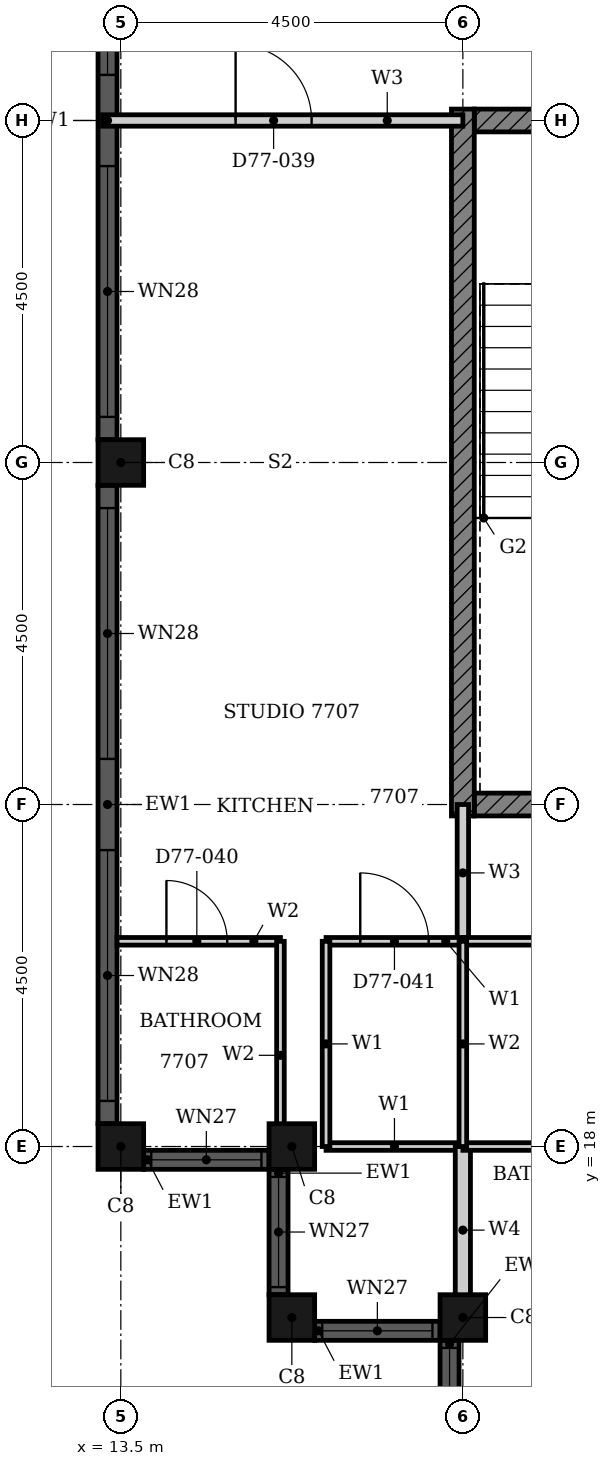
"""IFC4 building model, lengths in metres.
Left out: names, types, materials, properties, quantities, classifications, styles, units other than length and angle.
Written with IfcOpenShell. Run it as: python <this file> out.ifc"""

import sys

from ifc_helpers import new_model, si_unit, direction, frame, frame_2d, origin, origin_2d, place, context, subcontext, project, spatial, rectangle, hollow_rectangle, extrude, element, fill, save


model = new_model("IFC4")
c1 = context("Model", 3, precision=1e-05, world=origin(), true_north=direction((0.0, 1.0)))
c2 = subcontext(c1, "Body", "Model", "MODEL_VIEW")
j1 = project(units=[si_unit("LENGTHUNIT", "METRE"), si_unit("PLANEANGLEUNIT", "RADIAN")], contexts=[c1])
p1 = place(None, origin())
s1 = spatial("IfcSite", under=j1, at=p1, CompositionType="ELEMENT")
p2 = place(p1, origin())
s2 = spatial("IfcBuilding", under=s1, at=p2, CompositionType="ELEMENT")
p3 = place(p2, frame((0.0, 0.0, 301.9)))
s3 = spatial("IfcBuildingStorey", under=s2, at=p3, CompositionType="ELEMENT", Elevation=301.9)
for number, where, z_axis, x_axis in (
    (1, (13.5, 27.0, 0.0), (0.0, 0.0, 1.0), (1.0, 0.0, 0.0)),
    (2, (13.5, 18.0, 0.0), (0.0, 0.0, 1.0), (1.0, 0.0, 0.0)),
    (3, (15.75, 18.0, 0.0), (0.0, 0.0, 1.0), (1.0, 0.0, 0.0)),
    (4, (15.75, 15.75, 0.0), (0.0, 0.0, 1.0), (1.0, 0.0, 0.0)),
    (5, (18.0, 15.75, 0.0), (0.0, 0.0, 1.0), (1.0, 0.0, 0.0)),
):
    element("IfcColumn", number, at=place(p3, frame(where, z_axis=z_axis, x_axis=x_axis)), inside=s3, PredefinedType="COLUMN", context=c2, shape_type="SweptSolid", body=[
        extrude(hollow_rectangle(XDim=0.6, YDim=0.6, WallThickness=0.02, at=origin_2d()), origin(), (0.0, 0.0, 1.0), 3.7),
    ])
p4 = place(p3, frame((13.325, 35.7, 0.0), z_axis=(0.0, 0.0, 1.0), x_axis=(0.0, -1.0, 0.0)))
e6 = element("IfcWall", 6, at=p4, inside=s3, PredefinedType="SOLIDWALL", context=c2, shape_type="SweptSolid", body=[
    extrude(rectangle(XDim=8.4, YDim=0.25, at=frame_2d((4.2, 0.0))), origin(), (0.0, 0.0, 1.0), 3.7),
])
p5 = place(p4, frame((0.3, 0.0, 0.45)))
e7 = element("IfcOpeningElement", 7, at=p5, cuts=e6, PredefinedType="OPENING", context=c2, shape_type="SweptSolid", body=[
    extrude(rectangle(XDim=3.3, YDim=1.8, at=frame_2d((1.65, 0.9))), frame((0.0, 0.135, 0.0), z_axis=(0.0, -1.0, 0.0), x_axis=(1.0, 0.0, 0.0)), (0.0, 0.0, 1.0), 0.27),
])
p6 = place(p4, frame((4.8, 0.0, 0.45)))
e8 = element("IfcOpeningElement", 8, at=p6, cuts=e6, PredefinedType="OPENING", context=c2, shape_type="SweptSolid", body=[
    extrude(rectangle(XDim=3.3, YDim=1.8, at=frame_2d((1.65, 0.9))), frame((0.0, 0.135, 0.0), z_axis=(0.0, -1.0, 0.0), x_axis=(1.0, 0.0, 0.0)), (0.0, 0.0, 1.0), 0.27),
])
p7 = place(p3, frame((13.325, 26.7, 0.0), z_axis=(0.0, 0.0, 1.0), x_axis=(0.0, -1.0, 0.0)))
e9 = element("IfcWall", 9, at=p7, inside=s3, PredefinedType="SOLIDWALL", context=c2, shape_type="SweptSolid", body=[
    extrude(rectangle(XDim=8.4, YDim=0.25, at=frame_2d((4.2, 0.0))), origin(), (0.0, 0.0, 1.0), 3.7),
])
p8 = place(p7, frame((0.3, 0.0, 0.45)))
e10 = element("IfcOpeningElement", 10, at=p8, cuts=e9, PredefinedType="OPENING", context=c2, shape_type="SweptSolid", body=[
    extrude(rectangle(XDim=3.3, YDim=1.8, at=frame_2d((1.65, 0.9))), frame((0.0, 0.135, 0.0), z_axis=(0.0, -1.0, 0.0), x_axis=(1.0, 0.0, 0.0)), (0.0, 0.0, 1.0), 0.27),
])
p9 = place(p7, frame((4.8, 0.0, 0.45)))
e11 = element("IfcOpeningElement", 11, at=p9, cuts=e9, PredefinedType="OPENING", context=c2, shape_type="SweptSolid", body=[
    extrude(rectangle(XDim=3.3, YDim=1.8, at=frame_2d((1.65, 0.9))), frame((0.0, 0.135, 0.0), z_axis=(0.0, -1.0, 0.0), x_axis=(1.0, 0.0, 0.0)), (0.0, 0.0, 1.0), 0.27),
])
p10 = place(p3, frame((13.8, 17.825, 0.0), z_axis=(0.0, 0.0, 1.0), x_axis=(1.0, 0.0, 0.0)))
e12 = element("IfcWall", 12, at=p10, inside=s3, PredefinedType="SOLIDWALL", context=c2, shape_type="SweptSolid", body=[
    extrude(rectangle(XDim=1.65, YDim=0.25, at=frame_2d((0.825, 0.0))), origin(), (0.0, 0.0, 1.0), 3.7),
])
p11 = place(p10, frame((0.1, 0.0, 0.9)))
e13 = element("IfcOpeningElement", 13, at=p11, cuts=e12, PredefinedType="OPENING", context=c2, shape_type="SweptSolid", body=[
    extrude(rectangle(XDim=1.45, YDim=1.35, at=frame_2d((0.725, 0.675))), frame((0.0, 0.135, 0.0), z_axis=(0.0, -1.0, 0.0), x_axis=(1.0, 0.0, 0.0)), (0.0, 0.0, 1.0), 0.27),
])
p12 = place(p3, frame((15.575, 17.7, 0.0), z_axis=(0.0, 0.0, 1.0), x_axis=(0.0, -1.0, 0.0)))
e14 = element("IfcWall", 14, at=p12, inside=s3, PredefinedType="SOLIDWALL", context=c2, shape_type="SweptSolid", body=[
    extrude(rectangle(XDim=1.65, YDim=0.25, at=frame_2d((0.825, 0.0))), origin(), (0.0, 0.0, 1.0), 3.7),
])
p13 = place(p12, frame((0.1, 0.0, 0.9)))
e15 = element("IfcOpeningElement", 15, at=p13, cuts=e14, PredefinedType="OPENING", context=c2, shape_type="SweptSolid", body=[
    extrude(rectangle(XDim=1.45, YDim=1.35, at=frame_2d((0.725, 0.675))), frame((0.0, 0.135, 0.0), z_axis=(0.0, -1.0, 0.0), x_axis=(1.0, 0.0, 0.0)), (0.0, 0.0, 1.0), 0.27),
])
p14 = place(p3, frame((16.05, 15.575, 0.0), z_axis=(0.0, 0.0, 1.0), x_axis=(1.0, 0.0, 0.0)))
e16 = element("IfcWall", 16, at=p14, inside=s3, PredefinedType="SOLIDWALL", context=c2, shape_type="SweptSolid", body=[
    extrude(rectangle(XDim=1.65, YDim=0.25, at=frame_2d((0.825, 0.0))), origin(), (0.0, 0.0, 1.0), 3.7),
])
p15 = place(p14, frame((0.1, 0.0, 0.9)))
e17 = element("IfcOpeningElement", 17, at=p15, cuts=e16, PredefinedType="OPENING", context=c2, shape_type="SweptSolid", body=[
    extrude(rectangle(XDim=1.45, YDim=1.35, at=frame_2d((0.725, 0.675))), frame((0.0, 0.135, 0.0), z_axis=(0.0, -1.0, 0.0), x_axis=(1.0, 0.0, 0.0)), (0.0, 0.0, 1.0), 0.27),
])
p16 = place(p3, frame((17.825, 15.45, 0.0), z_axis=(0.0, 0.0, 1.0), x_axis=(0.0, -1.0, 0.0)))
e18 = element("IfcWall", 18, at=p16, inside=s3, PredefinedType="SOLIDWALL", context=c2, shape_type="SweptSolid", body=[
    extrude(rectangle(XDim=1.65, YDim=0.25, at=frame_2d((0.825, 0.0))), origin(), (0.0, 0.0, 1.0), 3.7),
])
p17 = place(p16, frame((0.1, 0.0, 0.9)))
e19 = element("IfcOpeningElement", 19, at=p17, cuts=e18, PredefinedType="OPENING", context=c2, shape_type="SweptSolid", body=[
    extrude(rectangle(XDim=1.45, YDim=1.35, at=frame_2d((0.725, 0.675))), frame((0.0, 0.135, 0.0), z_axis=(0.0, -1.0, 0.0), x_axis=(1.0, 0.0, 0.0)), (0.0, 0.0, 1.0), 0.27),
])
p18 = place(p3, frame((18.15, 22.5, 0.0), z_axis=(0.0, 0.0, 1.0), x_axis=(1.0, 0.0, 0.0)))
e20 = element("IfcWall", 20, at=p18, inside=s3, PredefinedType="SHEAR", context=c2, shape_type="SweptSolid", body=[
    extrude(rectangle(XDim=4.225, YDim=0.3, at=frame_2d((2.113, 0.0))), origin(), (0.0, 0.0, 1.0), 3.2),
])
p19 = place(p3, frame((18.15, 31.5, 0.0), z_axis=(0.0, 0.0, 1.0), x_axis=(1.0, 0.0, 0.0)))
e21 = element("IfcWall", 21, at=p19, inside=s3, PredefinedType="SHEAR", context=c2, shape_type="SweptSolid", body=[
    extrude(rectangle(XDim=9.368, YDim=0.3, at=frame_2d((4.684, 0.0))), origin(), (0.0, 0.0, 1.0), 3.2),
])
p20 = place(p19, frame((4.736, 0.0, 0.0)))
e22 = element("IfcOpeningElement", 22, at=p20, cuts=e21, PredefinedType="OPENING", context=c2, shape_type="SweptSolid", body=[
    extrude(rectangle(XDim=1.8, YDim=2.1, at=frame_2d((0.9, 1.05))), frame((0.0, 0.16, 0.0), z_axis=(0.0, -1.0, 0.0), x_axis=(1.0, 0.0, 0.0)), (0.0, 0.0, 1.0), 0.32),
])
p21 = place(p3, frame((18.0, 22.35, 0.0), z_axis=(0.0, 0.0, 1.0), x_axis=(0.0, 1.0, 0.0)))
e23 = element("IfcWall", 23, at=p21, inside=s3, PredefinedType="SHEAR", context=c2, shape_type="SweptSolid", body=[
    extrude(rectangle(XDim=9.3, YDim=0.3, at=frame_2d((4.65, 0.0))), origin(), (0.0, 0.0, 1.0), 3.2),
])
p22 = place(p3, frame((13.26, 31.5, 0.0), z_axis=(0.0, 0.0, 1.0), x_axis=(1.0, 0.0, 0.0)))
e24 = element("IfcWall", 24, at=p22, inside=s3, PredefinedType="PARTITIONING", context=c2, shape_type="SweptSolid", body=[
    extrude(rectangle(XDim=4.74, YDim=0.15, at=frame_2d((2.37, 0.0))), origin(), (0.0, 0.0, 1.0), 3.2),
])
p23 = place(p22, frame((1.75, 0.0, 0.0)))
e25 = element("IfcOpeningElement", 25, at=p23, cuts=e24, PredefinedType="OPENING", context=c2, shape_type="SweptSolid", body=[
    extrude(rectangle(XDim=1.0, YDim=2.2, at=frame_2d((0.5, 1.1))), frame((0.0, 0.085, 0.0), z_axis=(0.0, -1.0, 0.0), x_axis=(1.0, 0.0, 0.0)), (0.0, 0.0, 1.0), 0.17),
])
p24 = place(p3, frame((18.0, 20.7, 0.0), z_axis=(0.0, 0.0, 1.0), x_axis=(0.0, 1.0, 0.0)))
e26 = element("IfcWall", 26, at=p24, inside=s3, PredefinedType="PARTITIONING", context=c2, shape_type="SweptSolid", body=[
    extrude(rectangle(XDim=1.8, YDim=0.15, at=frame_2d((0.9, 0.0))), origin(), (0.0, 0.0, 1.0), 3.2),
])
p25 = place(p3, frame((16.2, 18.0, 0.0), z_axis=(0.0, 0.0, 1.0), x_axis=(1.0, 0.0, 0.0)))
e27 = element("IfcWall", 27, at=p25, inside=s3, PredefinedType="PARTITIONING", context=c2, shape_type="SweptSolid", body=[
    extrude(rectangle(XDim=1.8, YDim=0.1, at=frame_2d((0.9, 0.0))), origin(), (0.0, 0.0, 1.0), 3.2),
])
p26 = place(p3, frame((16.2, 20.7, 0.0), z_axis=(0.0, 0.0, 1.0), x_axis=(1.0, 0.0, 0.0)))
e28 = element("IfcWall", 28, at=p26, inside=s3, PredefinedType="PARTITIONING", context=c2, shape_type="SweptSolid", body=[
    extrude(rectangle(XDim=1.8, YDim=0.1, at=frame_2d((0.9, 0.0))), origin(), (0.0, 0.0, 1.0), 3.2),
])
p27 = place(p26, frame((0.45, 0.0, 0.0)))
e29 = element("IfcOpeningElement", 29, at=p27, cuts=e28, PredefinedType="OPENING", context=c2, shape_type="SweptSolid", body=[
    extrude(rectangle(XDim=0.9, YDim=2.1, at=frame_2d((0.45, 1.05))), frame((0.0, 0.06, 0.0), z_axis=(0.0, -1.0, 0.0), x_axis=(1.0, 0.0, 0.0)), (0.0, 0.0, 1.0), 0.12),
])
p28 = place(p3, frame((16.2, 18.0, 0.0), z_axis=(0.0, 0.0, 1.0), x_axis=(0.0, 1.0, 0.0)))
e30 = element("IfcWall", 30, at=p28, inside=s3, PredefinedType="PARTITIONING", context=c2, shape_type="SweptSolid", body=[
    extrude(rectangle(XDim=2.7, YDim=0.1, at=frame_2d((1.35, 0.0))), origin(), (0.0, 0.0, 1.0), 3.2),
])
p29 = place(p3, frame((18.0, 15.8, 0.0), z_axis=(0.0, 0.0, 1.0), x_axis=(0.0, 1.0, 0.0)))
e31 = element("IfcWall", 31, at=p29, inside=s3, PredefinedType="PARTITIONING", context=c2, shape_type="SweptSolid", body=[
    extrude(rectangle(XDim=2.2, YDim=0.2, at=frame_2d((1.1, 0.0))), origin(), (0.0, 0.0, 1.0), 3.2),
])
for number, where, z_axis, x_axis in (
    (32, (18.0, 18.0, 0.0), (0.0, 0.0, 1.0), (1.0, 0.0, 0.0)),
    (33, (18.0, 20.7, 0.0), (0.0, 0.0, 1.0), (1.0, 0.0, 0.0)),
):
    element("IfcWall", number, at=place(p3, frame(where, z_axis=z_axis, x_axis=x_axis)), inside=s3, PredefinedType="PARTITIONING", context=c2, shape_type="SweptSolid", body=[
        extrude(rectangle(XDim=2.4, YDim=0.1, at=frame_2d((1.2, 0.0))), origin(), (0.0, 0.0, 1.0), 3.2),
    ])
p30 = place(p3, frame((13.45, 20.7, 0.0), z_axis=(0.0, 0.0, 1.0), x_axis=(1.0, 0.0, 0.0)))
e34 = element("IfcWall", 34, at=p30, inside=s3, PredefinedType="PARTITIONING", context=c2, shape_type="SweptSolid", body=[
    extrude(rectangle(XDim=2.15, YDim=0.1, at=frame_2d((1.075, 0.0))), origin(), (0.0, 0.0, 1.0), 3.2),
])
p31 = place(p30, frame((0.65, 0.0, 0.0)))
e35 = element("IfcOpeningElement", 35, at=p31, cuts=e34, PredefinedType="OPENING", context=c2, shape_type="SweptSolid", body=[
    extrude(rectangle(XDim=0.8, YDim=2.1, at=frame_2d((0.4, 1.05))), frame((0.0, 0.06, 0.0), z_axis=(0.0, -1.0, 0.0), x_axis=(1.0, 0.0, 0.0)), (0.0, 0.0, 1.0), 0.12),
])
p32 = place(p3, frame((15.6, 17.7, 0.0), z_axis=(0.0, 0.0, 1.0), x_axis=(0.0, 1.0, 0.0)))
e36 = element("IfcWall", 36, at=p32, inside=s3, PredefinedType="PARTITIONING", context=c2, shape_type="SweptSolid", body=[
    extrude(rectangle(XDim=3.0, YDim=0.1, at=frame_2d((1.5, 0.0))), origin(), (0.0, 0.0, 1.0), 3.2),
])
p33 = place(p3, frame((18.0, 18.0, 0.0), z_axis=(0.0, 0.0, 1.0), x_axis=(0.0, 1.0, 0.0)))
e37 = element("IfcWall", 37, at=p33, inside=s3, PredefinedType="PARTITIONING", context=c2, shape_type="SweptSolid", body=[
    extrude(rectangle(XDim=2.7, YDim=0.1, at=frame_2d((1.35, 0.0))), origin(), (0.0, 0.0, 1.0), 3.2),
])
p34 = place(p5, origin())
e38 = element("IfcWindow", 38, at=p34, inside=s3, PartitioningType="SINGLE_PANEL", PredefinedType="WINDOW", context=c2, shape_type="SweptSolid", body=[
    extrude(rectangle(XDim=3.3, YDim=1.8, at=frame_2d((1.65, 0.9))), frame((0.0, 0.03, 0.0), z_axis=(0.0, -1.0, 0.0), x_axis=(1.0, 0.0, 0.0)), (0.0, 0.0, 1.0), 0.06),
])
fill(e7, e38)
p35 = place(p6, origin())
e39 = element("IfcWindow", 39, at=p35, inside=s3, PartitioningType="SINGLE_PANEL", PredefinedType="WINDOW", context=c2, shape_type="SweptSolid", body=[
    extrude(rectangle(XDim=3.3, YDim=1.8, at=frame_2d((1.65, 0.9))), frame((0.0, 0.03, 0.0), z_axis=(0.0, -1.0, 0.0), x_axis=(1.0, 0.0, 0.0)), (0.0, 0.0, 1.0), 0.06),
])
fill(e8, e39)
p36 = place(p8, origin())
e40 = element("IfcWindow", 40, at=p36, inside=s3, PartitioningType="SINGLE_PANEL", PredefinedType="WINDOW", context=c2, shape_type="SweptSolid", body=[
    extrude(rectangle(XDim=3.3, YDim=1.8, at=frame_2d((1.65, 0.9))), frame((0.0, 0.03, 0.0), z_axis=(0.0, -1.0, 0.0), x_axis=(1.0, 0.0, 0.0)), (0.0, 0.0, 1.0), 0.06),
])
fill(e10, e40)
p37 = place(p9, origin())
e41 = element("IfcWindow", 41, at=p37, inside=s3, PartitioningType="SINGLE_PANEL", PredefinedType="WINDOW", context=c2, shape_type="SweptSolid", body=[
    extrude(rectangle(XDim=3.3, YDim=1.8, at=frame_2d((1.65, 0.9))), frame((0.0, 0.03, 0.0), z_axis=(0.0, -1.0, 0.0), x_axis=(1.0, 0.0, 0.0)), (0.0, 0.0, 1.0), 0.06),
])
fill(e11, e41)
p38 = place(p11, origin())
e42 = element("IfcWindow", 42, at=p38, inside=s3, PartitioningType="SINGLE_PANEL", PredefinedType="WINDOW", context=c2, shape_type="SweptSolid", body=[
    extrude(rectangle(XDim=1.45, YDim=1.35, at=frame_2d((0.725, 0.675))), frame((0.0, 0.03, 0.0), z_axis=(0.0, -1.0, 0.0), x_axis=(1.0, 0.0, 0.0)), (0.0, 0.0, 1.0), 0.06),
])
fill(e13, e42)
p39 = place(p13, origin())
e43 = element("IfcWindow", 43, at=p39, inside=s3, PartitioningType="SINGLE_PANEL", PredefinedType="WINDOW", context=c2, shape_type="SweptSolid", body=[
    extrude(rectangle(XDim=1.45, YDim=1.35, at=frame_2d((0.725, 0.675))), frame((0.0, 0.03, 0.0), z_axis=(0.0, -1.0, 0.0), x_axis=(1.0, 0.0, 0.0)), (0.0, 0.0, 1.0), 0.06),
])
fill(e15, e43)
p40 = place(p15, origin())
e44 = element("IfcWindow", 44, at=p40, inside=s3, PartitioningType="SINGLE_PANEL", PredefinedType="WINDOW", context=c2, shape_type="SweptSolid", body=[
    extrude(rectangle(XDim=1.45, YDim=1.35, at=frame_2d((0.725, 0.675))), frame((0.0, 0.03, 0.0), z_axis=(0.0, -1.0, 0.0), x_axis=(1.0, 0.0, 0.0)), (0.0, 0.0, 1.0), 0.06),
])
fill(e17, e44)
p41 = place(p17, origin())
e45 = element("IfcWindow", 45, at=p41, inside=s3, PartitioningType="SINGLE_PANEL", PredefinedType="WINDOW", context=c2, shape_type="SweptSolid", body=[
    extrude(rectangle(XDim=1.45, YDim=1.35, at=frame_2d((0.725, 0.675))), frame((0.0, 0.03, 0.0), z_axis=(0.0, -1.0, 0.0), x_axis=(1.0, 0.0, 0.0)), (0.0, 0.0, 1.0), 0.06),
])
fill(e19, e45)
p42 = place(p23, origin())
e46 = element("IfcDoor", 46, at=p42, inside=s3, OperationType="SINGLE_SWING_RIGHT", PredefinedType="DOOR", context=c2, shape_type="SweptSolid", body=[
    extrude(rectangle(XDim=1.0, YDim=2.2, at=frame_2d((0.5, 1.1))), frame((0.0, 0.025, 0.0), z_axis=(0.0, -1.0, 0.0), x_axis=(1.0, 0.0, 0.0)), (0.0, 0.0, 1.0), 0.05),
])
fill(e25, e46)
p43 = place(p31, origin())
e47 = element("IfcDoor", 47, at=p43, inside=s3, OperationType="SINGLE_SWING_LEFT", PredefinedType="DOOR", context=c2, shape_type="SweptSolid", body=[
    extrude(rectangle(XDim=0.8, YDim=2.1, at=frame_2d((0.4, 1.05))), frame((0.0, 0.025, 0.0), z_axis=(0.0, -1.0, 0.0), x_axis=(1.0, 0.0, 0.0)), (0.0, 0.0, 1.0), 0.05),
])
fill(e35, e47)
p44 = place(p27, origin())
e48 = element("IfcDoor", 48, at=p44, inside=s3, OperationType="SINGLE_SWING_RIGHT", PredefinedType="DOOR", context=c2, shape_type="SweptSolid", body=[
    extrude(rectangle(XDim=0.9, YDim=2.1, at=frame_2d((0.45, 1.05))), frame((0.0, 0.025, 0.0), z_axis=(0.0, -1.0, 0.0), x_axis=(1.0, 0.0, 0.0)), (0.0, 0.0, 1.0), 0.05),
])
fill(e29, e48)
save(model, sys.argv[1])
